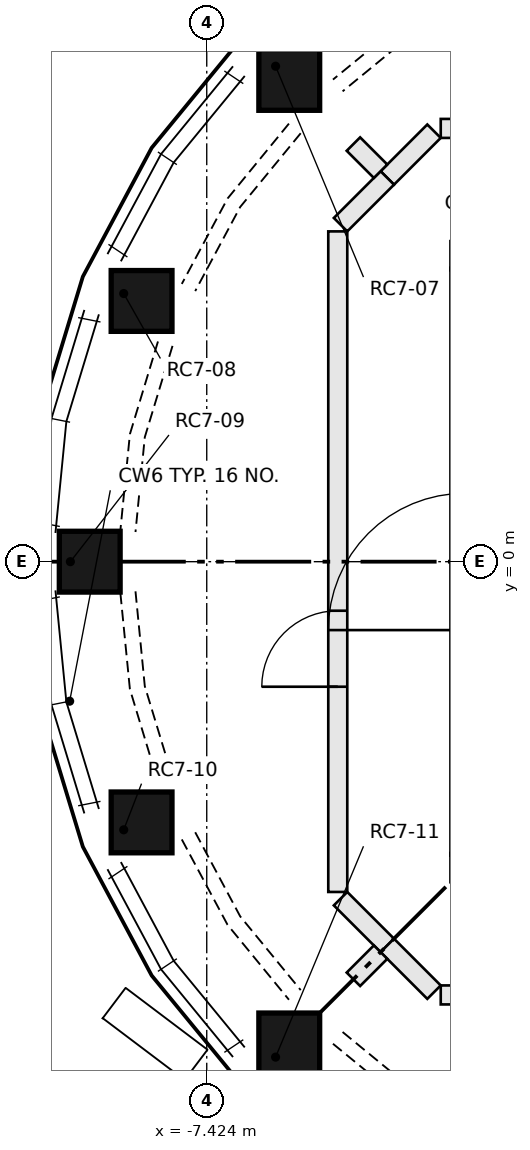
"""IFC4 building model, lengths in metres.
Left out: names, types, materials, properties, quantities, classifications, styles, units other than length and angle.
Written with IfcOpenShell. Run it as: python <this file> out.ifc"""

import sys

from ifc_helpers import new_model, si_unit, direction, frame, frame_2d, origin, origin_2d, place, context, subcontext, project, spatial, rectangle, extrude, element, fill, save


model = new_model("IFC4")
c1 = context("Model", 3, precision=1e-05, world=origin(), true_north=direction((0.0, 1.0)))
c2 = subcontext(c1, "Body", "Model", "MODEL_VIEW")
j1 = project(units=[si_unit("LENGTHUNIT", "METRE"), si_unit("PLANEANGLEUNIT", "RADIAN")], contexts=[c1])
p1 = place(None, origin())
s1 = spatial("IfcSite", under=j1, at=p1, CompositionType="ELEMENT")
p2 = place(p1, origin())
s2 = spatial("IfcBuilding", under=s1, at=p2, CompositionType="ELEMENT")
p3 = place(p2, frame((0.0, 0.0, 244.4)))
s3 = spatial("IfcBuildingStorey", under=s2, at=p3, CompositionType="ELEMENT", Elevation=244.4)
p4 = place(p3, frame((-6.518, 6.518, 0.5), z_axis=(0.0, 0.0, 1.0), x_axis=(0.707106781187, 0.707106781187, 0.0)))
e1 = element("IfcColumn", 1, at=p4, inside=s3, PredefinedType="COLUMN", context=c2, shape_type="SweptSolid", body=[
    extrude(rectangle(XDim=0.8, YDim=0.8, at=origin_2d()), origin(), (0.0, -0.342, 0.94), 2.979),
])
p5 = place(p3, frame((-8.517, 3.528, 0.5), z_axis=(0.0, 0.0, 1.0), x_axis=(0.38269062517, 0.923876553121, 0.0)))
e2 = element("IfcColumn", 2, at=p5, inside=s3, PredefinedType="COLUMN", context=c2, shape_type="SweptSolid", body=[
    extrude(rectangle(XDim=0.8, YDim=0.8, at=origin_2d()), origin(), (0.0, -0.342, 0.94), 2.979),
])
p6 = place(p3, frame((-9.218, 0.0, 0.5), z_axis=(0.0, 0.0, 1.0), x_axis=(0.0, 1.0, 0.0)))
e3 = element("IfcColumn", 3, at=p6, inside=s3, PredefinedType="COLUMN", context=c2, shape_type="SweptSolid", body=[
    extrude(rectangle(XDim=0.8, YDim=0.8, at=origin_2d()), origin(), (0.0, -0.342, 0.94), 2.979),
])
p7 = place(p3, frame((-8.517, -3.528, 0.5), z_axis=(0.0, 0.0, 1.0), x_axis=(-0.38269062517, 0.923876553121, 0.0)))
e4 = element("IfcColumn", 4, at=p7, inside=s3, PredefinedType="COLUMN", context=c2, shape_type="SweptSolid", body=[
    extrude(rectangle(XDim=0.8, YDim=0.8, at=origin_2d()), origin(), (0.0, -0.342, 0.94), 2.979),
])
p8 = place(p3, frame((-6.518, -6.518, 0.5), z_axis=(0.0, 0.0, 1.0), x_axis=(-0.707106781187, 0.707106781187, 0.0)))
e5 = element("IfcColumn", 5, at=p8, inside=s3, PredefinedType="COLUMN", context=c2, shape_type="SweptSolid", body=[
    extrude(rectangle(XDim=0.8, YDim=0.8, at=origin_2d()), origin(), (0.0, -0.342, 0.94), 2.979),
])
p9 = place(p3, frame((-5.049, 5.049, 0.0), z_axis=(0.0, 0.0, 1.0), x_axis=(0.707247149774, 0.706966384729, 0.0)))
e6 = element("IfcWall", 6, at=p9, inside=s3, PredefinedType="PARTITIONING", context=c2, shape_type="SweptSolid", body=[
    extrude(rectangle(XDim=0.87, YDim=0.25, at=frame_2d((0.435, 0.0))), origin(), (0.0, 0.0, 1.0), 2.95),
])
p10 = place(p3, frame((-4.345, 5.7, 0.0), z_axis=(0.0, 0.0, 1.0), x_axis=(1.0, 0.0, 0.0)))
e7 = element("IfcWall", 7, at=p10, inside=s3, PredefinedType="PARTITIONING", context=c2, shape_type="SweptSolid", body=[
    extrude(rectangle(XDim=8.69, YDim=0.25, at=frame_2d((4.345, 0.0))), origin(), (0.0, 0.0, 1.0), 2.95),
])
p11 = place(p10, frame((2.7, 0.0, 0.0)))
e8 = element("IfcOpeningElement", 8, at=p11, cuts=e7, PredefinedType="OPENING", context=c2, shape_type="SweptSolid", body=[
    extrude(rectangle(XDim=1.0, YDim=2.1, at=frame_2d((0.5, 1.05))), frame((0.0, 0.135, 0.0), z_axis=(0.0, -1.0, 0.0), x_axis=(1.0, 0.0, 0.0)), (0.0, 0.0, 1.0), 0.27),
])
p12 = place(p3, frame((-5.7, -4.345, 0.0), z_axis=(0.0, 0.0, 1.0), x_axis=(0.0, 1.0, 0.0)))
e9 = element("IfcWall", 9, at=p12, inside=s3, PredefinedType="PARTITIONING", context=c2, shape_type="SweptSolid", body=[
    extrude(rectangle(XDim=8.69, YDim=0.25, at=frame_2d((4.345, 0.0))), origin(), (0.0, 0.0, 1.0), 2.95),
])
p13 = place(p12, frame((2.7, 0.0, 0.0)))
e10 = element("IfcOpeningElement", 10, at=p13, cuts=e9, PredefinedType="OPENING", context=c2, shape_type="SweptSolid", body=[
    extrude(rectangle(XDim=1.0, YDim=2.1, at=frame_2d((0.5, 1.05))), frame((0.0, 0.135, 0.0), z_axis=(0.0, -1.0, 0.0), x_axis=(1.0, 0.0, 0.0)), (0.0, 0.0, 1.0), 0.27),
])
for number, where, z_axis, x_axis in (
    (11, (-5.663, 4.434, 0.0), (0.0, 0.0, 1.0), (0.707, 0.707, 0.0)),
    (12, (-5.049, -5.049, 0.0), (0.0, 0.0, 1.0), (-0.707, 0.707, 0.0)),
    (13, (-4.434, -5.663, 0.0), (0.0, 0.0, 1.0), (-0.707, 0.707, 0.0)),
):
    element("IfcWall", number, at=place(p3, frame(where, z_axis=z_axis, x_axis=x_axis)), inside=s3, PredefinedType="PARTITIONING", context=c2, shape_type="SweptSolid", body=[
        extrude(rectangle(XDim=0.87, YDim=0.25, at=frame_2d((0.435, 0.0))), origin(), (0.0, 0.0, 1.0), 2.95),
    ])
p14 = place(p3, frame((4.345, -5.7, 0.0), z_axis=(0.0, 0.0, 1.0), x_axis=(-1.0, 0.0, 0.0)))
e14 = element("IfcWall", 14, at=p14, inside=s3, PredefinedType="PARTITIONING", context=c2, shape_type="SweptSolid", body=[
    extrude(rectangle(XDim=8.69, YDim=0.25, at=frame_2d((4.345, 0.0))), origin(), (0.0, 0.0, 1.0), 2.95),
])
p15 = place(p14, frame((2.7, 0.0, 0.0)))
e15 = element("IfcOpeningElement", 15, at=p15, cuts=e14, PredefinedType="OPENING", context=c2, shape_type="SweptSolid", body=[
    extrude(rectangle(XDim=1.0, YDim=2.1, at=frame_2d((0.5, 1.05))), frame((0.0, 0.135, 0.0), z_axis=(0.0, -1.0, 0.0), x_axis=(1.0, 0.0, 0.0)), (0.0, 0.0, 1.0), 0.27),
])
for number, where, z_axis, x_axis in (
    (16, (-5.137, 5.137, 0.0), (0.0, 0.0, 1.0), (-0.707, 0.707, 0.0)),
    (17, (-5.137, -5.137, 0.0), (0.0, 0.0, 1.0), (-0.707, -0.707, 0.0)),
):
    element("IfcWall", number, at=place(p3, frame(where, z_axis=z_axis, x_axis=x_axis)), inside=s3, PredefinedType="PARTITIONING", context=c2, shape_type="SweptSolid", body=[
        extrude(rectangle(XDim=0.505, YDim=0.25, at=frame_2d((0.252, 0.0))), origin(), (0.0, 0.0, 1.0), 2.95),
    ])
p16 = place(p13, origin())
e18 = element("IfcDoor", 18, at=p16, inside=s3, OperationType="SINGLE_SWING_LEFT", PredefinedType="DOOR", context=c2, shape_type="SweptSolid", body=[
    extrude(rectangle(XDim=1.0, YDim=2.1, at=frame_2d((0.5, 1.05))), frame((0.0, 0.025, 0.0), z_axis=(0.0, -1.0, 0.0), x_axis=(1.0, 0.0, 0.0)), (0.0, 0.0, 1.0), 0.05),
])
fill(e10, e18)
save(model, sys.argv[1])
